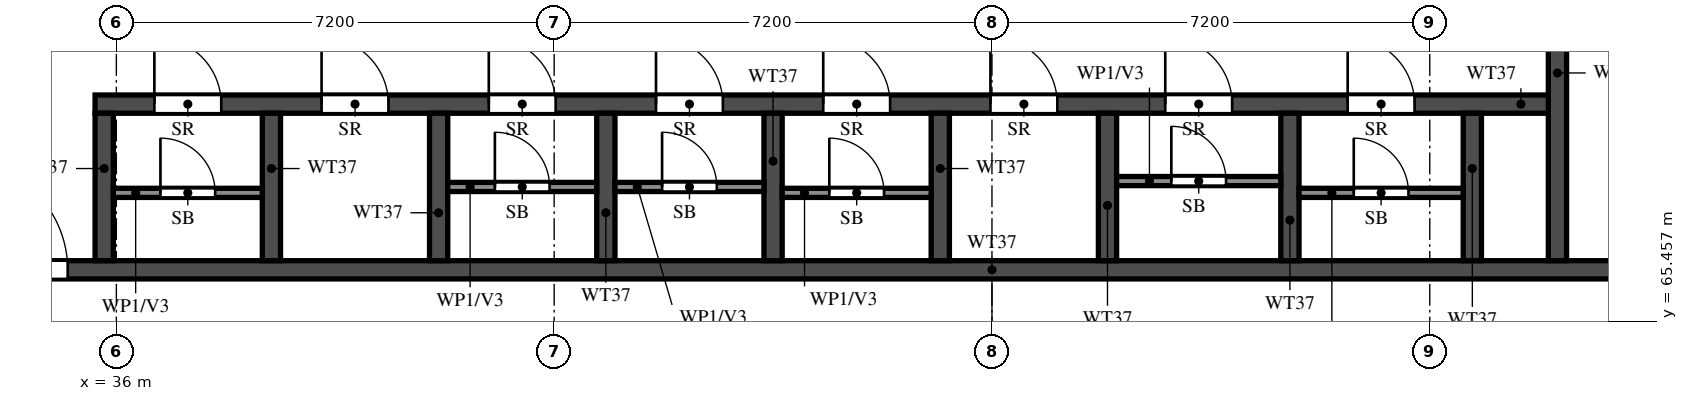
"""IFC4 building model, lengths in metres.
Left out: names, types, materials, properties, quantities, classifications, styles, units other than length and angle.
Written with IfcOpenShell. Run it as: python <this file> out.ifc"""

import sys

from ifc_helpers import new_model, si_unit, direction, frame, frame_2d, origin, place, context, subcontext, project, spatial, rectangle, extrude, element, fill, save


model = new_model("IFC4")
c1 = context("Model", 3, precision=1e-05, world=origin(), true_north=direction((0.0, 1.0)))
c2 = subcontext(c1, "Body", "Model", "MODEL_VIEW")
j1 = project(units=[si_unit("LENGTHUNIT", "METRE"), si_unit("PLANEANGLEUNIT", "RADIAN")], contexts=[c1])
p1 = place(None, origin())
s1 = spatial("IfcSite", under=j1, at=p1, CompositionType="ELEMENT")
p2 = place(p1, origin())
s2 = spatial("IfcBuilding", under=s1, at=p2, CompositionType="ELEMENT")
p3 = place(p2, frame((0.0, 0.0, 225.5)))
s3 = spatial("IfcBuildingStorey", under=s2, at=p3, CompositionType="ELEMENT", Elevation=225.5)
p4 = place(p3, frame((29.2, 66.3, 0.0), z_axis=(0.0, 0.0, 1.0), x_axis=(1.0, 0.0, 0.0)))
e1 = element("IfcWall", 1, at=p4, inside=s3, PredefinedType="SHEAR", context=c2, shape_type="SweptSolid", body=[
    extrude(rectangle(XDim=42.4, YDim=0.3, at=frame_2d((21.2, 0.0))), origin(), (0.0, 0.0, 1.0), 3.22),
])
p5 = place(p4, frame((1.425, 0.0, 0.0)))
e2 = element("IfcOpeningElement", 2, at=p5, cuts=e1, PredefinedType="OPENING", context=c2, shape_type="SweptSolid", body=[
    extrude(rectangle(XDim=1.1, YDim=2.1, at=frame_2d((0.55, 1.05))), frame((0.0, 0.16, 0.0), z_axis=(0.0, -1.0, 0.0), x_axis=(1.0, 0.0, 0.0)), (0.0, 0.0, 1.0), 0.32),
])
p6 = place(p4, frame((4.2, 0.0, 0.0)))
e3 = element("IfcOpeningElement", 3, at=p6, cuts=e1, PredefinedType="OPENING", context=c2, shape_type="SweptSolid", body=[
    extrude(rectangle(XDim=1.8, YDim=2.1, at=frame_2d((0.9, 1.05))), frame((0.0, 0.16, 0.0), z_axis=(0.0, -1.0, 0.0), x_axis=(1.0, 0.0, 0.0)), (0.0, 0.0, 1.0), 0.32),
])
p7 = place(p3, frame((35.65, 69.025, 0.0), z_axis=(0.0, 0.0, 1.0), x_axis=(1.0, 0.0, 0.0)))
e4 = element("IfcWall", 4, at=p7, inside=s3, PredefinedType="SHEAR", context=c2, shape_type="SweptSolid", body=[
    extrude(rectangle(XDim=24.05, YDim=0.3, at=frame_2d((12.025, 0.0))), origin(), (0.0, 0.0, 1.0), 3.22),
])
p8 = place(p7, frame((0.975, 0.0, 0.0)))
e5 = element("IfcOpeningElement", 5, at=p8, cuts=e4, PredefinedType="OPENING", context=c2, shape_type="SweptSolid", body=[
    extrude(rectangle(XDim=1.1, YDim=2.1, at=frame_2d((0.55, 1.05))), frame((0.0, 0.16, 0.0), z_axis=(0.0, -1.0, 0.0), x_axis=(1.0, 0.0, 0.0)), (0.0, 0.0, 1.0), 0.32),
])
p9 = place(p7, frame((3.725, 0.0, 0.0)))
e6 = element("IfcOpeningElement", 6, at=p9, cuts=e4, PredefinedType="OPENING", context=c2, shape_type="SweptSolid", body=[
    extrude(rectangle(XDim=1.1, YDim=2.1, at=frame_2d((0.55, 1.05))), frame((0.0, 0.16, 0.0), z_axis=(0.0, -1.0, 0.0), x_axis=(1.0, 0.0, 0.0)), (0.0, 0.0, 1.0), 0.32),
])
p10 = place(p7, frame((6.475, 0.0, 0.0)))
e7 = element("IfcOpeningElement", 7, at=p10, cuts=e4, PredefinedType="OPENING", context=c2, shape_type="SweptSolid", body=[
    extrude(rectangle(XDim=1.1, YDim=2.1, at=frame_2d((0.55, 1.05))), frame((0.0, 0.16, 0.0), z_axis=(0.0, -1.0, 0.0), x_axis=(1.0, 0.0, 0.0)), (0.0, 0.0, 1.0), 0.32),
])
p11 = place(p7, frame((9.225, 0.0, 0.0)))
e8 = element("IfcOpeningElement", 8, at=p11, cuts=e4, PredefinedType="OPENING", context=c2, shape_type="SweptSolid", body=[
    extrude(rectangle(XDim=1.1, YDim=2.1, at=frame_2d((0.55, 1.05))), frame((0.0, 0.16, 0.0), z_axis=(0.0, -1.0, 0.0), x_axis=(1.0, 0.0, 0.0)), (0.0, 0.0, 1.0), 0.32),
])
p12 = place(p7, frame((11.975, 0.0, 0.0)))
e9 = element("IfcOpeningElement", 9, at=p12, cuts=e4, PredefinedType="OPENING", context=c2, shape_type="SweptSolid", body=[
    extrude(rectangle(XDim=1.1, YDim=2.1, at=frame_2d((0.55, 1.05))), frame((0.0, 0.16, 0.0), z_axis=(0.0, -1.0, 0.0), x_axis=(1.0, 0.0, 0.0)), (0.0, 0.0, 1.0), 0.32),
])
p13 = place(p7, frame((14.725, 0.0, 0.0)))
e10 = element("IfcOpeningElement", 10, at=p13, cuts=e4, PredefinedType="OPENING", context=c2, shape_type="SweptSolid", body=[
    extrude(rectangle(XDim=1.1, YDim=2.1, at=frame_2d((0.55, 1.05))), frame((0.0, 0.16, 0.0), z_axis=(0.0, -1.0, 0.0), x_axis=(1.0, 0.0, 0.0)), (0.0, 0.0, 1.0), 0.32),
])
p14 = place(p7, frame((17.6, 0.0, 0.0)))
e11 = element("IfcOpeningElement", 11, at=p14, cuts=e4, PredefinedType="OPENING", context=c2, shape_type="SweptSolid", body=[
    extrude(rectangle(XDim=1.1, YDim=2.1, at=frame_2d((0.55, 1.05))), frame((0.0, 0.16, 0.0), z_axis=(0.0, -1.0, 0.0), x_axis=(1.0, 0.0, 0.0)), (0.0, 0.0, 1.0), 0.32),
])
p15 = place(p7, frame((20.6, 0.0, 0.0)))
e12 = element("IfcOpeningElement", 12, at=p15, cuts=e4, PredefinedType="OPENING", context=c2, shape_type="SweptSolid", body=[
    extrude(rectangle(XDim=1.1, YDim=2.1, at=frame_2d((0.55, 1.05))), frame((0.0, 0.16, 0.0), z_axis=(0.0, -1.0, 0.0), x_axis=(1.0, 0.0, 0.0)), (0.0, 0.0, 1.0), 0.32),
])
p16 = place(p3, frame((59.7, 66.45, 0.0), z_axis=(0.0, 0.0, 1.0), x_axis=(0.0, 1.0, 0.0)))
e13 = element("IfcWall", 13, at=p16, inside=s3, PredefinedType="SHEAR", context=c2, shape_type="SweptSolid", body=[
    extrude(rectangle(XDim=6.175, YDim=0.3, at=frame_2d((3.087, 0.0))), origin(), (0.0, 0.0, 1.0), 3.22),
])
p17 = place(p16, frame((3.85, 0.0, 0.0)))
e14 = element("IfcOpeningElement", 14, at=p17, cuts=e13, PredefinedType="OPENING", context=c2, shape_type="SweptSolid", body=[
    extrude(rectangle(XDim=1.2, YDim=2.1, at=frame_2d((0.6, 1.05))), frame((0.0, 0.16, 0.0), z_axis=(0.0, -1.0, 0.0), x_axis=(1.0, 0.0, 0.0)), (0.0, 0.0, 1.0), 0.32),
])
for number, where, z_axis, x_axis in (
    (15, (35.8, 66.45, 0.0), (0.0, 0.0, 1.0), (0.0, 1.0, 0.0)),
    (16, (38.55, 66.45, 0.0), (0.0, 0.0, 1.0), (0.0, 1.0, 0.0)),
    (17, (41.3, 66.45, 0.0), (0.0, 0.0, 1.0), (0.0, 1.0, 0.0)),
    (18, (44.05, 66.45, 0.0), (0.0, 0.0, 1.0), (0.0, 1.0, 0.0)),
    (19, (46.8, 66.45, 0.0), (0.0, 0.0, 1.0), (0.0, 1.0, 0.0)),
    (20, (49.55, 66.45, 0.0), (0.0, 0.0, 1.0), (0.0, 1.0, 0.0)),
    (21, (52.3, 66.45, 0.0), (0.0, 0.0, 1.0), (0.0, 1.0, 0.0)),
    (22, (55.3, 66.45, 0.0), (0.0, 0.0, 1.0), (0.0, 1.0, 0.0)),
    (23, (58.3, 66.45, 0.0), (0.0, 0.0, 1.0), (0.0, 1.0, 0.0)),
):
    element("IfcWall", number, at=place(p3, frame(where, z_axis=z_axis, x_axis=x_axis)), inside=s3, PredefinedType="SHEAR", context=c2, shape_type="SweptSolid", body=[
        extrude(rectangle(XDim=2.425, YDim=0.3, at=frame_2d((1.212, 0.0))), origin(), (0.0, 0.0, 1.0), 3.22),
    ])
p18 = place(p3, frame((35.95, 67.565, 0.0), z_axis=(0.0, 0.0, 1.0), x_axis=(1.0, 0.0, 0.0)))
e24 = element("IfcWall", 24, at=p18, inside=s3, PredefinedType="PARTITIONING", context=c2, shape_type="SweptSolid", body=[
    extrude(rectangle(XDim=2.45, YDim=0.15, at=frame_2d((1.225, 0.0))), origin(), (0.0, 0.0, 1.0), 3.22),
])
p19 = place(p18, frame((0.775, 0.0, 0.0)))
e25 = element("IfcOpeningElement", 25, at=p19, cuts=e24, PredefinedType="OPENING", context=c2, shape_type="SweptSolid", body=[
    extrude(rectangle(XDim=0.9, YDim=2.1, at=frame_2d((0.45, 1.05))), frame((0.0, 0.085, 0.0), z_axis=(0.0, -1.0, 0.0), x_axis=(1.0, 0.0, 0.0)), (0.0, 0.0, 1.0), 0.17),
])
p20 = place(p3, frame((41.45, 67.663, 0.0), z_axis=(0.0, 0.0, 1.0), x_axis=(1.0, 0.0, 0.0)))
e26 = element("IfcWall", 26, at=p20, inside=s3, PredefinedType="PARTITIONING", context=c2, shape_type="SweptSolid", body=[
    extrude(rectangle(XDim=2.45, YDim=0.15, at=frame_2d((1.225, 0.0))), origin(), (0.0, 0.0, 1.0), 3.22),
])
p21 = place(p20, frame((0.775, 0.0, 0.0)))
e27 = element("IfcOpeningElement", 27, at=p21, cuts=e26, PredefinedType="OPENING", context=c2, shape_type="SweptSolid", body=[
    extrude(rectangle(XDim=0.9, YDim=2.1, at=frame_2d((0.45, 1.05))), frame((0.0, 0.085, 0.0), z_axis=(0.0, -1.0, 0.0), x_axis=(1.0, 0.0, 0.0)), (0.0, 0.0, 1.0), 0.17),
])
p22 = place(p3, frame((44.2, 67.663, 0.0), z_axis=(0.0, 0.0, 1.0), x_axis=(1.0, 0.0, 0.0)))
e28 = element("IfcWall", 28, at=p22, inside=s3, PredefinedType="PARTITIONING", context=c2, shape_type="SweptSolid", body=[
    extrude(rectangle(XDim=2.45, YDim=0.15, at=frame_2d((1.225, 0.0))), origin(), (0.0, 0.0, 1.0), 3.22),
])
p23 = place(p22, frame((0.775, 0.0, 0.0)))
e29 = element("IfcOpeningElement", 29, at=p23, cuts=e28, PredefinedType="OPENING", context=c2, shape_type="SweptSolid", body=[
    extrude(rectangle(XDim=0.9, YDim=2.1, at=frame_2d((0.45, 1.05))), frame((0.0, 0.085, 0.0), z_axis=(0.0, -1.0, 0.0), x_axis=(1.0, 0.0, 0.0)), (0.0, 0.0, 1.0), 0.17),
])
p24 = place(p3, frame((46.95, 67.565, 0.0), z_axis=(0.0, 0.0, 1.0), x_axis=(1.0, 0.0, 0.0)))
e30 = element("IfcWall", 30, at=p24, inside=s3, PredefinedType="PARTITIONING", context=c2, shape_type="SweptSolid", body=[
    extrude(rectangle(XDim=2.45, YDim=0.15, at=frame_2d((1.225, 0.0))), origin(), (0.0, 0.0, 1.0), 3.22),
])
p25 = place(p24, frame((0.775, 0.0, 0.0)))
e31 = element("IfcOpeningElement", 31, at=p25, cuts=e30, PredefinedType="OPENING", context=c2, shape_type="SweptSolid", body=[
    extrude(rectangle(XDim=0.9, YDim=2.1, at=frame_2d((0.45, 1.05))), frame((0.0, 0.085, 0.0), z_axis=(0.0, -1.0, 0.0), x_axis=(1.0, 0.0, 0.0)), (0.0, 0.0, 1.0), 0.17),
])
p26 = place(p3, frame((52.45, 67.76, 0.0), z_axis=(0.0, 0.0, 1.0), x_axis=(1.0, 0.0, 0.0)))
e32 = element("IfcWall", 32, at=p26, inside=s3, PredefinedType="PARTITIONING", context=c2, shape_type="SweptSolid", body=[
    extrude(rectangle(XDim=2.7, YDim=0.15, at=frame_2d((1.35, 0.0))), origin(), (0.0, 0.0, 1.0), 3.22),
])
p27 = place(p26, frame((0.9, 0.0, 0.0)))
e33 = element("IfcOpeningElement", 33, at=p27, cuts=e32, PredefinedType="OPENING", context=c2, shape_type="SweptSolid", body=[
    extrude(rectangle(XDim=0.9, YDim=2.1, at=frame_2d((0.45, 1.05))), frame((0.0, 0.085, 0.0), z_axis=(0.0, -1.0, 0.0), x_axis=(1.0, 0.0, 0.0)), (0.0, 0.0, 1.0), 0.17),
])
p28 = place(p3, frame((55.45, 67.565, 0.0), z_axis=(0.0, 0.0, 1.0), x_axis=(1.0, 0.0, 0.0)))
e34 = element("IfcWall", 34, at=p28, inside=s3, PredefinedType="PARTITIONING", context=c2, shape_type="SweptSolid", body=[
    extrude(rectangle(XDim=2.7, YDim=0.15, at=frame_2d((1.35, 0.0))), origin(), (0.0, 0.0, 1.0), 3.22),
])
p29 = place(p28, frame((0.9, 0.0, 0.0)))
e35 = element("IfcOpeningElement", 35, at=p29, cuts=e34, PredefinedType="OPENING", context=c2, shape_type="SweptSolid", body=[
    extrude(rectangle(XDim=0.9, YDim=2.1, at=frame_2d((0.45, 1.05))), frame((0.0, 0.085, 0.0), z_axis=(0.0, -1.0, 0.0), x_axis=(1.0, 0.0, 0.0)), (0.0, 0.0, 1.0), 0.17),
])
p30 = place(p6, origin())
e36 = element("IfcDoor", 36, at=p30, inside=s3, OperationType="DOUBLE_DOOR_SINGLE_SWING", PredefinedType="DOOR", context=c2, shape_type="SweptSolid", body=[
    extrude(rectangle(XDim=1.8, YDim=2.1, at=frame_2d((0.9, 1.05))), frame((0.0, 0.025, 0.0), z_axis=(0.0, -1.0, 0.0), x_axis=(1.0, 0.0, 0.0)), (0.0, 0.0, 1.0), 0.05),
])
fill(e3, e36)
p31 = place(p8, origin())
e37 = element("IfcDoor", 37, at=p31, inside=s3, OperationType="SINGLE_SWING_RIGHT", PredefinedType="DOOR", context=c2, shape_type="SweptSolid", body=[
    extrude(rectangle(XDim=1.1, YDim=2.1, at=frame_2d((0.55, 1.05))), frame((0.0, 0.025, 0.0), z_axis=(0.0, -1.0, 0.0), x_axis=(1.0, 0.0, 0.0)), (0.0, 0.0, 1.0), 0.05),
])
fill(e5, e37)
p32 = place(p19, origin())
e38 = element("IfcDoor", 38, at=p32, inside=s3, OperationType="SINGLE_SWING_RIGHT", PredefinedType="DOOR", context=c2, shape_type="SweptSolid", body=[
    extrude(rectangle(XDim=0.9, YDim=2.1, at=frame_2d((0.45, 1.05))), frame((0.0, 0.025, 0.0), z_axis=(0.0, -1.0, 0.0), x_axis=(1.0, 0.0, 0.0)), (0.0, 0.0, 1.0), 0.05),
])
fill(e25, e38)
p33 = place(p9, origin())
e39 = element("IfcDoor", 39, at=p33, inside=s3, OperationType="SINGLE_SWING_LEFT", PredefinedType="DOOR", context=c2, shape_type="SweptSolid", body=[
    extrude(rectangle(XDim=1.1, YDim=2.1, at=frame_2d((0.55, 1.05))), frame((0.0, 0.025, 0.0), z_axis=(0.0, -1.0, 0.0), x_axis=(1.0, 0.0, 0.0)), (0.0, 0.0, 1.0), 0.05),
])
fill(e6, e39)
p34 = place(p10, origin())
e40 = element("IfcDoor", 40, at=p34, inside=s3, OperationType="SINGLE_SWING_RIGHT", PredefinedType="DOOR", context=c2, shape_type="SweptSolid", body=[
    extrude(rectangle(XDim=1.1, YDim=2.1, at=frame_2d((0.55, 1.05))), frame((0.0, 0.025, 0.0), z_axis=(0.0, -1.0, 0.0), x_axis=(1.0, 0.0, 0.0)), (0.0, 0.0, 1.0), 0.05),
])
fill(e7, e40)
p35 = place(p21, origin())
e41 = element("IfcDoor", 41, at=p35, inside=s3, OperationType="SINGLE_SWING_RIGHT", PredefinedType="DOOR", context=c2, shape_type="SweptSolid", body=[
    extrude(rectangle(XDim=0.9, YDim=2.1, at=frame_2d((0.45, 1.05))), frame((0.0, 0.025, 0.0), z_axis=(0.0, -1.0, 0.0), x_axis=(1.0, 0.0, 0.0)), (0.0, 0.0, 1.0), 0.05),
])
fill(e27, e41)
p36 = place(p11, origin())
e42 = element("IfcDoor", 42, at=p36, inside=s3, OperationType="SINGLE_SWING_LEFT", PredefinedType="DOOR", context=c2, shape_type="SweptSolid", body=[
    extrude(rectangle(XDim=1.1, YDim=2.1, at=frame_2d((0.55, 1.05))), frame((0.0, 0.025, 0.0), z_axis=(0.0, -1.0, 0.0), x_axis=(1.0, 0.0, 0.0)), (0.0, 0.0, 1.0), 0.05),
])
fill(e8, e42)
p37 = place(p23, origin())
e43 = element("IfcDoor", 43, at=p37, inside=s3, OperationType="SINGLE_SWING_LEFT", PredefinedType="DOOR", context=c2, shape_type="SweptSolid", body=[
    extrude(rectangle(XDim=0.9, YDim=2.1, at=frame_2d((0.45, 1.05))), frame((0.0, 0.025, 0.0), z_axis=(0.0, -1.0, 0.0), x_axis=(1.0, 0.0, 0.0)), (0.0, 0.0, 1.0), 0.05),
])
fill(e29, e43)
p38 = place(p12, origin())
e44 = element("IfcDoor", 44, at=p38, inside=s3, OperationType="SINGLE_SWING_RIGHT", PredefinedType="DOOR", context=c2, shape_type="SweptSolid", body=[
    extrude(rectangle(XDim=1.1, YDim=2.1, at=frame_2d((0.55, 1.05))), frame((0.0, 0.025, 0.0), z_axis=(0.0, -1.0, 0.0), x_axis=(1.0, 0.0, 0.0)), (0.0, 0.0, 1.0), 0.05),
])
fill(e9, e44)
p39 = place(p25, origin())
e45 = element("IfcDoor", 45, at=p39, inside=s3, OperationType="SINGLE_SWING_RIGHT", PredefinedType="DOOR", context=c2, shape_type="SweptSolid", body=[
    extrude(rectangle(XDim=0.9, YDim=2.1, at=frame_2d((0.45, 1.05))), frame((0.0, 0.025, 0.0), z_axis=(0.0, -1.0, 0.0), x_axis=(1.0, 0.0, 0.0)), (0.0, 0.0, 1.0), 0.05),
])
fill(e31, e45)
p40 = place(p13, origin())
e46 = element("IfcDoor", 46, at=p40, inside=s3, OperationType="SINGLE_SWING_LEFT", PredefinedType="DOOR", context=c2, shape_type="SweptSolid", body=[
    extrude(rectangle(XDim=1.1, YDim=2.1, at=frame_2d((0.55, 1.05))), frame((0.0, 0.025, 0.0), z_axis=(0.0, -1.0, 0.0), x_axis=(1.0, 0.0, 0.0)), (0.0, 0.0, 1.0), 0.05),
])
fill(e10, e46)
p41 = place(p14, origin())
e47 = element("IfcDoor", 47, at=p41, inside=s3, OperationType="SINGLE_SWING_RIGHT", PredefinedType="DOOR", context=c2, shape_type="SweptSolid", body=[
    extrude(rectangle(XDim=1.1, YDim=2.1, at=frame_2d((0.55, 1.05))), frame((0.0, 0.025, 0.0), z_axis=(0.0, -1.0, 0.0), x_axis=(1.0, 0.0, 0.0)), (0.0, 0.0, 1.0), 0.05),
])
fill(e11, e47)
p42 = place(p27, origin())
e48 = element("IfcDoor", 48, at=p42, inside=s3, OperationType="SINGLE_SWING_LEFT", PredefinedType="DOOR", context=c2, shape_type="SweptSolid", body=[
    extrude(rectangle(XDim=0.9, YDim=2.1, at=frame_2d((0.45, 1.05))), frame((0.0, 0.025, 0.0), z_axis=(0.0, -1.0, 0.0), x_axis=(1.0, 0.0, 0.0)), (0.0, 0.0, 1.0), 0.05),
])
fill(e33, e48)
p43 = place(p15, origin())
e49 = element("IfcDoor", 49, at=p43, inside=s3, OperationType="SINGLE_SWING_RIGHT", PredefinedType="DOOR", context=c2, shape_type="SweptSolid", body=[
    extrude(rectangle(XDim=1.1, YDim=2.1, at=frame_2d((0.55, 1.05))), frame((0.0, 0.025, 0.0), z_axis=(0.0, -1.0, 0.0), x_axis=(1.0, 0.0, 0.0)), (0.0, 0.0, 1.0), 0.05),
])
fill(e12, e49)
p44 = place(p29, origin())
e50 = element("IfcDoor", 50, at=p44, inside=s3, OperationType="SINGLE_SWING_RIGHT", PredefinedType="DOOR", context=c2, shape_type="SweptSolid", body=[
    extrude(rectangle(XDim=0.9, YDim=2.1, at=frame_2d((0.45, 1.05))), frame((0.0, 0.025, 0.0), z_axis=(0.0, -1.0, 0.0), x_axis=(1.0, 0.0, 0.0)), (0.0, 0.0, 1.0), 0.05),
])
fill(e35, e50)
save(model, sys.argv[1])
